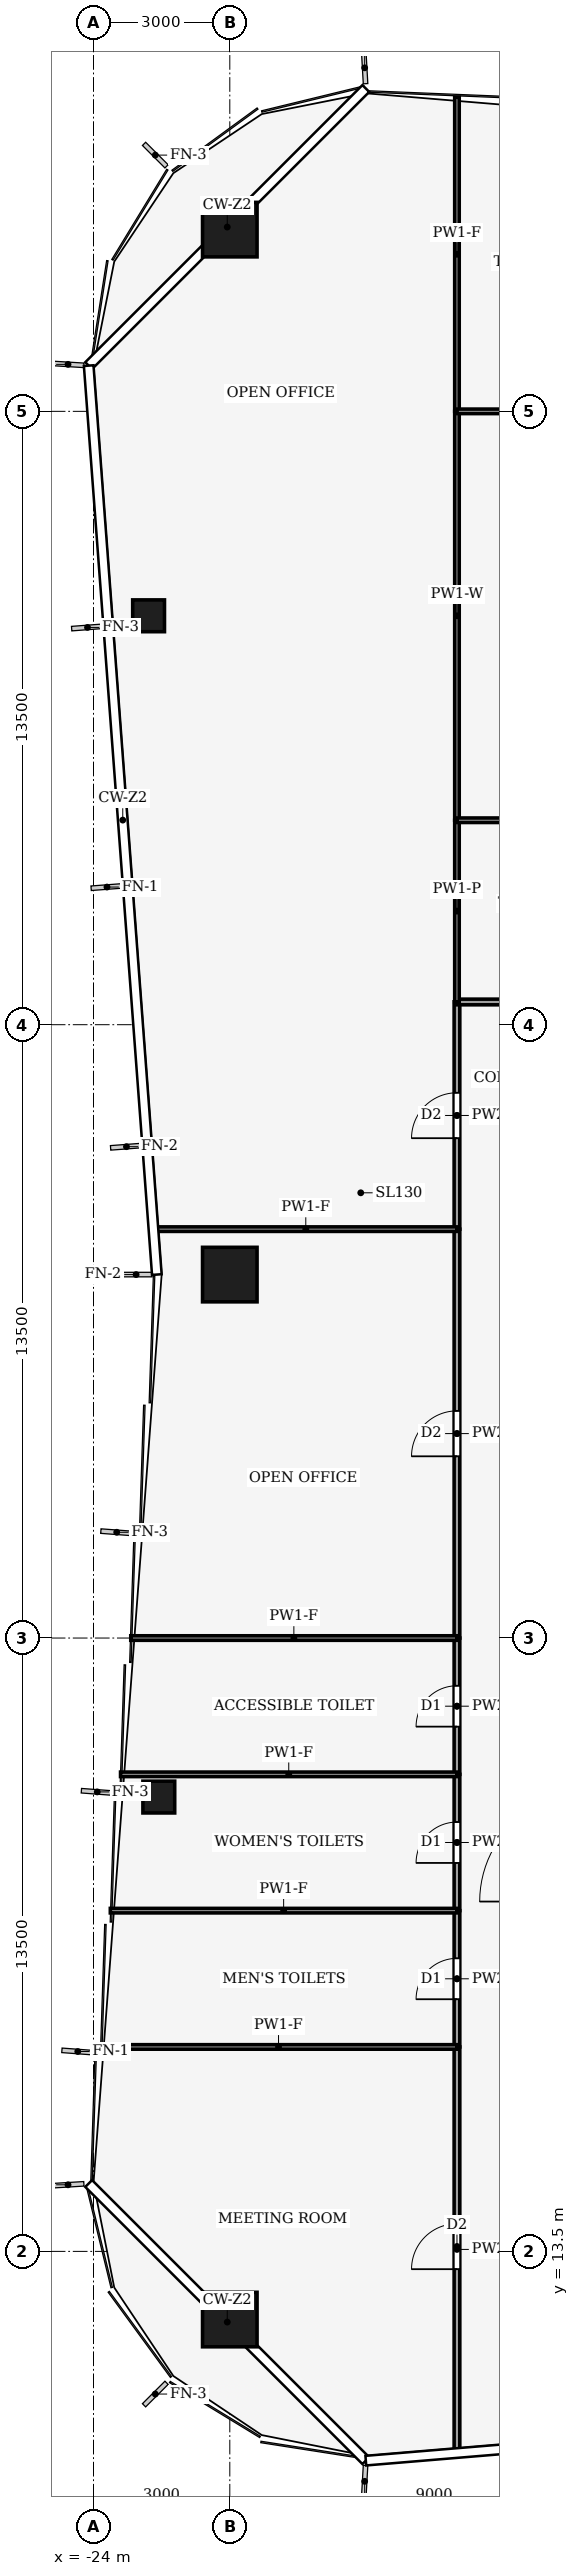
"""IFC4 building model, lengths in metres.
Left out: names, types, materials, properties, quantities, classifications, styles, units other than length and angle.
Written with IfcOpenShell. Run it as: python <this file> out.ifc"""

import sys

from ifc_helpers import new_model, si_unit, direction, frame, frame_2d, origin, origin_2d, place, context, subcontext, project, spatial, rectangle, hollow_rectangle, extrude, element, fill, save


model = new_model("IFC4")
c1 = context("Model", 3, precision=1e-05, world=origin(), true_north=direction((0.0, 1.0)))
c2 = subcontext(c1, "Body", "Model", "MODEL_VIEW")
j1 = project(units=[si_unit("LENGTHUNIT", "METRE"), si_unit("PLANEANGLEUNIT", "RADIAN")], contexts=[c1])
p1 = place(None, origin())
s1 = spatial("IfcSite", under=j1, at=p1, CompositionType="ELEMENT")
p2 = place(p1, origin())
s2 = spatial("IfcBuilding", under=s1, at=p2, CompositionType="ELEMENT")
p3 = place(p2, frame((0.0, 0.0, 126.0)))
s3 = spatial("IfcBuildingStorey", under=s2, at=p3, CompositionType="ELEMENT", Elevation=126.0)
for number, where, z_axis, x_axis in (
    (1, (-21.0, 58.0, 0.0), (0.0, 0.0, 1.0), (1.0, 0.0, 0.0)),
    (2, (-21.0, 12.0, 0.0), (0.0, 0.0, 1.0), (1.0, 0.0, 0.0)),
    (3, (-21.0, 35.0, 0.0), (0.0, 0.0, 1.0), (1.0, 0.0, 0.0)),
):
    element("IfcColumn", number, at=place(p3, frame(where, z_axis=z_axis, x_axis=x_axis)), inside=s3, PredefinedType="COLUMN", context=c2, shape_type="SweptSolid", body=[
        extrude(hollow_rectangle(XDim=1.2, YDim=1.2, WallThickness=0.07, at=origin_2d()), origin(), (0.0, 0.0, 1.0), 4.0),
    ])
for number, where, z_axis, x_axis in (
    (4, (-22.562, 23.5, 0.0), (0.0, 0.0, 1.0), (1.0, 0.0, 0.0)),
    (5, (-22.788, 49.5, 0.0), (0.0, 0.0, 1.0), (1.0, 0.0, 0.0)),
):
    element("IfcColumn", number, at=place(p3, frame(where, z_axis=z_axis, x_axis=x_axis)), inside=s3, PredefinedType="COLUMN", context=c2, shape_type="SweptSolid", body=[
        extrude(hollow_rectangle(XDim=0.7, YDim=0.7, WallThickness=0.03, at=origin_2d()), origin(), (0.0, 0.0, 1.0), 4.0),
    ])
p4 = place(p3, frame((-16.0, 9.087, 0.0), z_axis=(0.0, 0.0, 1.0), x_axis=(0.0, 1.0, 0.0)))
e6 = element("IfcWall", 6, at=p4, inside=s3, PredefinedType="PARTITIONING", context=c2, shape_type="SweptSolid", body=[
    extrude(rectangle(XDim=8.913, YDim=0.125, at=frame_2d((4.457, 0.0))), origin(), (0.0, 0.0, 1.0), 3.04),
])
p5 = place(p4, frame((4.022, 0.0, 0.0)))
e7 = element("IfcOpeningElement", 7, at=p5, cuts=e6, PredefinedType="OPENING", context=c2, shape_type="SweptSolid", body=[
    extrude(rectangle(XDim=1.0, YDim=2.1, at=frame_2d((0.5, 1.05))), frame((0.0, 0.073, 0.0), z_axis=(0.0, -1.0, 0.0), x_axis=(1.0, 0.0, 0.0)), (0.0, 0.0, 1.0), 0.145),
])
p6 = place(p3, frame((-16.0, 18.0, 0.0), z_axis=(0.0, 0.0, 1.0), x_axis=(0.0, 1.0, 0.0)))
e8 = element("IfcWall", 8, at=p6, inside=s3, PredefinedType="PARTITIONING", context=c2, shape_type="SweptSolid", body=[
    extrude(rectangle(XDim=3.0, YDim=0.125, at=frame_2d((1.5, 0.0))), origin(), (0.0, 0.0, 1.0), 3.48),
])
p7 = place(p6, frame((1.05, 0.0, 0.0)))
e9 = element("IfcOpeningElement", 9, at=p7, cuts=e8, PredefinedType="OPENING", context=c2, shape_type="SweptSolid", body=[
    extrude(rectangle(XDim=0.9, YDim=2.1, at=frame_2d((0.45, 1.05))), frame((0.0, 0.073, 0.0), z_axis=(0.0, -1.0, 0.0), x_axis=(1.0, 0.0, 0.0)), (0.0, 0.0, 1.0), 0.145),
])
p8 = place(p3, frame((-16.0, 21.0, 0.0), z_axis=(0.0, 0.0, 1.0), x_axis=(0.0, 1.0, 0.0)))
e10 = element("IfcWall", 10, at=p8, inside=s3, PredefinedType="PARTITIONING", context=c2, shape_type="SweptSolid", body=[
    extrude(rectangle(XDim=3.0, YDim=0.125, at=frame_2d((1.5, 0.0))), origin(), (0.0, 0.0, 1.0), 3.48),
])
p9 = place(p8, frame((1.05, 0.0, 0.0)))
e11 = element("IfcOpeningElement", 11, at=p9, cuts=e10, PredefinedType="OPENING", context=c2, shape_type="SweptSolid", body=[
    extrude(rectangle(XDim=0.9, YDim=2.1, at=frame_2d((0.45, 1.05))), frame((0.0, 0.073, 0.0), z_axis=(0.0, -1.0, 0.0), x_axis=(1.0, 0.0, 0.0)), (0.0, 0.0, 1.0), 0.145),
])
p10 = place(p3, frame((-16.0, 24.0, 0.0), z_axis=(0.0, 0.0, 1.0), x_axis=(0.0, 1.0, 0.0)))
e12 = element("IfcWall", 12, at=p10, inside=s3, PredefinedType="PARTITIONING", context=c2, shape_type="SweptSolid", body=[
    extrude(rectangle(XDim=3.0, YDim=0.125, at=frame_2d((1.5, 0.0))), origin(), (0.0, 0.0, 1.0), 3.87),
])
p11 = place(p10, frame((1.05, 0.0, 0.0)))
e13 = element("IfcOpeningElement", 13, at=p11, cuts=e12, PredefinedType="OPENING", context=c2, shape_type="SweptSolid", body=[
    extrude(rectangle(XDim=0.9, YDim=2.1, at=frame_2d((0.45, 1.05))), frame((0.0, 0.073, 0.0), z_axis=(0.0, -1.0, 0.0), x_axis=(1.0, 0.0, 0.0)), (0.0, 0.0, 1.0), 0.145),
])
p12 = place(p3, frame((-16.0, 27.0, 0.0), z_axis=(0.0, 0.0, 1.0), x_axis=(0.0, 1.0, 0.0)))
e14 = element("IfcWall", 14, at=p12, inside=s3, PredefinedType="PARTITIONING", context=c2, shape_type="SweptSolid", body=[
    extrude(rectangle(XDim=9.0, YDim=0.125, at=frame_2d((4.5, 0.0))), origin(), (0.0, 0.0, 1.0), 3.48),
])
p13 = place(p12, frame((4.0, 0.0, 0.0)))
e15 = element("IfcOpeningElement", 15, at=p13, cuts=e14, PredefinedType="OPENING", context=c2, shape_type="SweptSolid", body=[
    extrude(rectangle(XDim=1.0, YDim=2.1, at=frame_2d((0.5, 1.05))), frame((0.0, 0.073, 0.0), z_axis=(0.0, -1.0, 0.0), x_axis=(1.0, 0.0, 0.0)), (0.0, 0.0, 1.0), 0.145),
])
p14 = place(p3, frame((-16.0, 36.0, 0.0), z_axis=(0.0, 0.0, 1.0), x_axis=(0.0, 1.0, 0.0)))
e16 = element("IfcWall", 16, at=p14, inside=s3, PredefinedType="PARTITIONING", context=c2, shape_type="SweptSolid", body=[
    extrude(rectangle(XDim=5.004, YDim=0.125, at=frame_2d((2.502, 0.0))), origin(), (0.0, 0.0, 1.0), 3.14),
])
p15 = place(p14, frame((2.002, 0.0, 0.0)))
e17 = element("IfcOpeningElement", 17, at=p15, cuts=e16, PredefinedType="OPENING", context=c2, shape_type="SweptSolid", body=[
    extrude(rectangle(XDim=1.0, YDim=2.1, at=frame_2d((0.5, 1.05))), frame((0.0, 0.073, 0.0), z_axis=(0.0, -1.0, 0.0), x_axis=(1.0, 0.0, 0.0)), (0.0, 0.0, 1.0), 0.145),
])
p16 = place(p3, frame((-16.0, 41.0, 0.0), z_axis=(0.0, 0.0, 1.0), x_axis=(1.0, 0.0, 0.0)))
e18 = element("IfcWall", 18, at=p16, inside=s3, PredefinedType="PARTITIONING", context=c2, shape_type="SweptSolid", body=[
    extrude(rectangle(XDim=4.0, YDim=0.125, at=frame_2d((2.0, 0.0))), origin(), (0.0, 0.0, 1.0), 3.44),
])
p17 = place(p16, frame((1.5, 0.0, 0.0)))
e19 = element("IfcOpeningElement", 19, at=p17, cuts=e18, PredefinedType="OPENING", context=c2, shape_type="SweptSolid", body=[
    extrude(rectangle(XDim=1.0, YDim=2.1, at=frame_2d((0.5, 1.05))), frame((0.0, 0.073, 0.0), z_axis=(0.0, -1.0, 0.0), x_axis=(1.0, 0.0, 0.0)), (0.0, 0.0, 1.0), 0.145),
])
p18 = place(p3, frame((-16.0, 18.0, 0.0), z_axis=(0.0, 0.0, 1.0), x_axis=(-1.0, 0.0, 0.0)))
e20 = element("IfcWall", 20, at=p18, inside=s3, PredefinedType="PARTITIONING", context=c2, shape_type="SweptSolid", body=[
    extrude(rectangle(XDim=7.855, YDim=0.1, at=frame_2d((3.927, 0.0))), origin(), (0.0, 0.0, 1.0), 3.04),
])
p19 = place(p3, frame((-16.0, 21.0, 0.0), z_axis=(0.0, 0.0, 1.0), x_axis=(-1.0, 0.0, 0.0)))
e21 = element("IfcWall", 21, at=p19, inside=s3, PredefinedType="PARTITIONING", context=c2, shape_type="SweptSolid", body=[
    extrude(rectangle(XDim=7.63, YDim=0.1, at=frame_2d((3.815, 0.0))), origin(), (0.0, 0.0, 1.0), 3.04),
])
p20 = place(p3, frame((-16.0, 24.0, 0.0), z_axis=(0.0, 0.0, 1.0), x_axis=(-1.0, 0.0, 0.0)))
e22 = element("IfcWall", 22, at=p20, inside=s3, PredefinedType="PARTITIONING", context=c2, shape_type="SweptSolid", body=[
    extrude(rectangle(XDim=7.405, YDim=0.1, at=frame_2d((3.703, 0.0))), origin(), (0.0, 0.0, 1.0), 3.04),
])
p21 = place(p3, frame((-16.0, 27.0, 0.0), z_axis=(0.0, 0.0, 1.0), x_axis=(-1.0, 0.0, 0.0)))
e23 = element("IfcWall", 23, at=p21, inside=s3, PredefinedType="PARTITIONING", context=c2, shape_type="SweptSolid", body=[
    extrude(rectangle(XDim=7.18, YDim=0.1, at=frame_2d((3.59, 0.0))), origin(), (0.0, 0.0, 1.0), 3.04),
])
p22 = place(p3, frame((-16.0, 36.0, 0.0), z_axis=(0.0, 0.0, 1.0), x_axis=(-1.0, 0.0, 0.0)))
e24 = element("IfcWall", 24, at=p22, inside=s3, PredefinedType="PARTITIONING", context=c2, shape_type="SweptSolid", body=[
    extrude(rectangle(XDim=6.655, YDim=0.1, at=frame_2d((3.328, 0.0))), origin(), (0.0, 0.0, 1.0), 3.04),
])
p23 = place(p3, frame((-16.0, 41.0, 0.0), z_axis=(0.0, 0.0, 1.0), x_axis=(0.0, 1.0, 0.0)))
e25 = element("IfcWall", 25, at=p23, inside=s3, PredefinedType="PARTITIONING", context=c2, shape_type="SweptSolid", body=[
    extrude(rectangle(XDim=4.0, YDim=0.1, at=frame_2d((2.0, 0.0))), origin(), (0.0, 0.0, 1.0), 3.44),
])
p24 = place(p3, frame((-16.0, 45.0, 0.0), z_axis=(0.0, 0.0, 1.0), x_axis=(0.0, 1.0, 0.0)))
e26 = element("IfcWall", 26, at=p24, inside=s3, PredefinedType="PARTITIONING", context=c2, shape_type="SweptSolid", body=[
    extrude(rectangle(XDim=9.0, YDim=0.1, at=frame_2d((4.5, 0.0))), origin(), (0.0, 0.0, 1.0), 3.24),
])
p25 = place(p3, frame((-16.0, 54.0, 0.0), z_axis=(0.0, 0.0, 1.0), x_axis=(0.0, 1.0, 0.0)))
e27 = element("IfcWall", 27, at=p25, inside=s3, PredefinedType="PARTITIONING", context=c2, shape_type="SweptSolid", body=[
    extrude(rectangle(XDim=6.913, YDim=0.1, at=frame_2d((3.457, 0.0))), origin(), (0.0, 0.0, 1.0), 3.04),
])
p26 = place(p3, frame((-11.996, 45.0, 0.0), z_axis=(0.0, 0.0, 1.0), x_axis=(-1.0, 0.0, 0.0)))
e28 = element("IfcWall", 28, at=p26, inside=s3, PredefinedType="PARTITIONING", context=c2, shape_type="SweptSolid", body=[
    extrude(rectangle(XDim=4.004, YDim=0.1, at=frame_2d((2.002, 0.0))), origin(), (0.0, 0.0, 1.0), 3.87),
])
p27 = place(p3, frame((-16.0, 54.0, 0.0), z_axis=(0.0, 0.0, 1.0), x_axis=(1.0, 0.0, 0.0)))
e29 = element("IfcWall", 29, at=p27, inside=s3, PredefinedType="PARTITIONING", context=c2, shape_type="SweptSolid", body=[
    extrude(rectangle(XDim=13.0, YDim=0.1, at=frame_2d((6.5, 0.0))), origin(), (0.0, 0.0, 1.0), 3.44),
])
p28 = place(p27, frame((6.0, 0.0, 0.0)))
e30 = element("IfcOpeningElement", 30, at=p28, cuts=e29, PredefinedType="OPENING", context=c2, shape_type="SweptSolid", body=[
    extrude(rectangle(XDim=1.0, YDim=2.1, at=frame_2d((0.5, 1.05))), frame((0.0, 0.06, 0.0), z_axis=(0.0, -1.0, 0.0), x_axis=(1.0, 0.0, 0.0)), (0.0, 0.0, 1.0), 0.12),
])
p29 = place(p5, origin())
e31 = element("IfcDoor", 31, at=p29, inside=s3, OperationType="SINGLE_SWING_RIGHT", PredefinedType="DOOR", context=c2, shape_type="SweptSolid", body=[
    extrude(rectangle(XDim=1.0, YDim=2.1, at=frame_2d((0.5, 1.05))), frame((0.0, 0.025, 0.0), z_axis=(0.0, -1.0, 0.0), x_axis=(1.0, 0.0, 0.0)), (0.0, 0.0, 1.0), 0.05),
])
fill(e7, e31)
p30 = place(p7, origin())
e32 = element("IfcDoor", 32, at=p30, inside=s3, OperationType="SINGLE_SWING_RIGHT", PredefinedType="DOOR", context=c2, shape_type="SweptSolid", body=[
    extrude(rectangle(XDim=0.9, YDim=2.1, at=frame_2d((0.45, 1.05))), frame((0.0, 0.025, 0.0), z_axis=(0.0, -1.0, 0.0), x_axis=(1.0, 0.0, 0.0)), (0.0, 0.0, 1.0), 0.05),
])
fill(e9, e32)
p31 = place(p9, origin())
e33 = element("IfcDoor", 33, at=p31, inside=s3, OperationType="SINGLE_SWING_LEFT", PredefinedType="DOOR", context=c2, shape_type="SweptSolid", body=[
    extrude(rectangle(XDim=0.9, YDim=2.1, at=frame_2d((0.45, 1.05))), frame((0.0, 0.025, 0.0), z_axis=(0.0, -1.0, 0.0), x_axis=(1.0, 0.0, 0.0)), (0.0, 0.0, 1.0), 0.05),
])
fill(e11, e33)
p32 = place(p11, origin())
e34 = element("IfcDoor", 34, at=p32, inside=s3, OperationType="SINGLE_SWING_RIGHT", PredefinedType="DOOR", context=c2, shape_type="SweptSolid", body=[
    extrude(rectangle(XDim=0.9, YDim=2.1, at=frame_2d((0.45, 1.05))), frame((0.0, 0.025, 0.0), z_axis=(0.0, -1.0, 0.0), x_axis=(1.0, 0.0, 0.0)), (0.0, 0.0, 1.0), 0.05),
])
fill(e13, e34)
p33 = place(p13, origin())
e35 = element("IfcDoor", 35, at=p33, inside=s3, OperationType="SINGLE_SWING_LEFT", PredefinedType="DOOR", context=c2, shape_type="SweptSolid", body=[
    extrude(rectangle(XDim=1.0, YDim=2.1, at=frame_2d((0.5, 1.05))), frame((0.0, 0.025, 0.0), z_axis=(0.0, -1.0, 0.0), x_axis=(1.0, 0.0, 0.0)), (0.0, 0.0, 1.0), 0.05),
])
fill(e15, e35)
p34 = place(p15, origin())
e36 = element("IfcDoor", 36, at=p34, inside=s3, OperationType="SINGLE_SWING_RIGHT", PredefinedType="DOOR", context=c2, shape_type="SweptSolid", body=[
    extrude(rectangle(XDim=1.0, YDim=2.1, at=frame_2d((0.5, 1.05))), frame((0.0, 0.025, 0.0), z_axis=(0.0, -1.0, 0.0), x_axis=(1.0, 0.0, 0.0)), (0.0, 0.0, 1.0), 0.05),
])
fill(e17, e36)
save(model, sys.argv[1])
